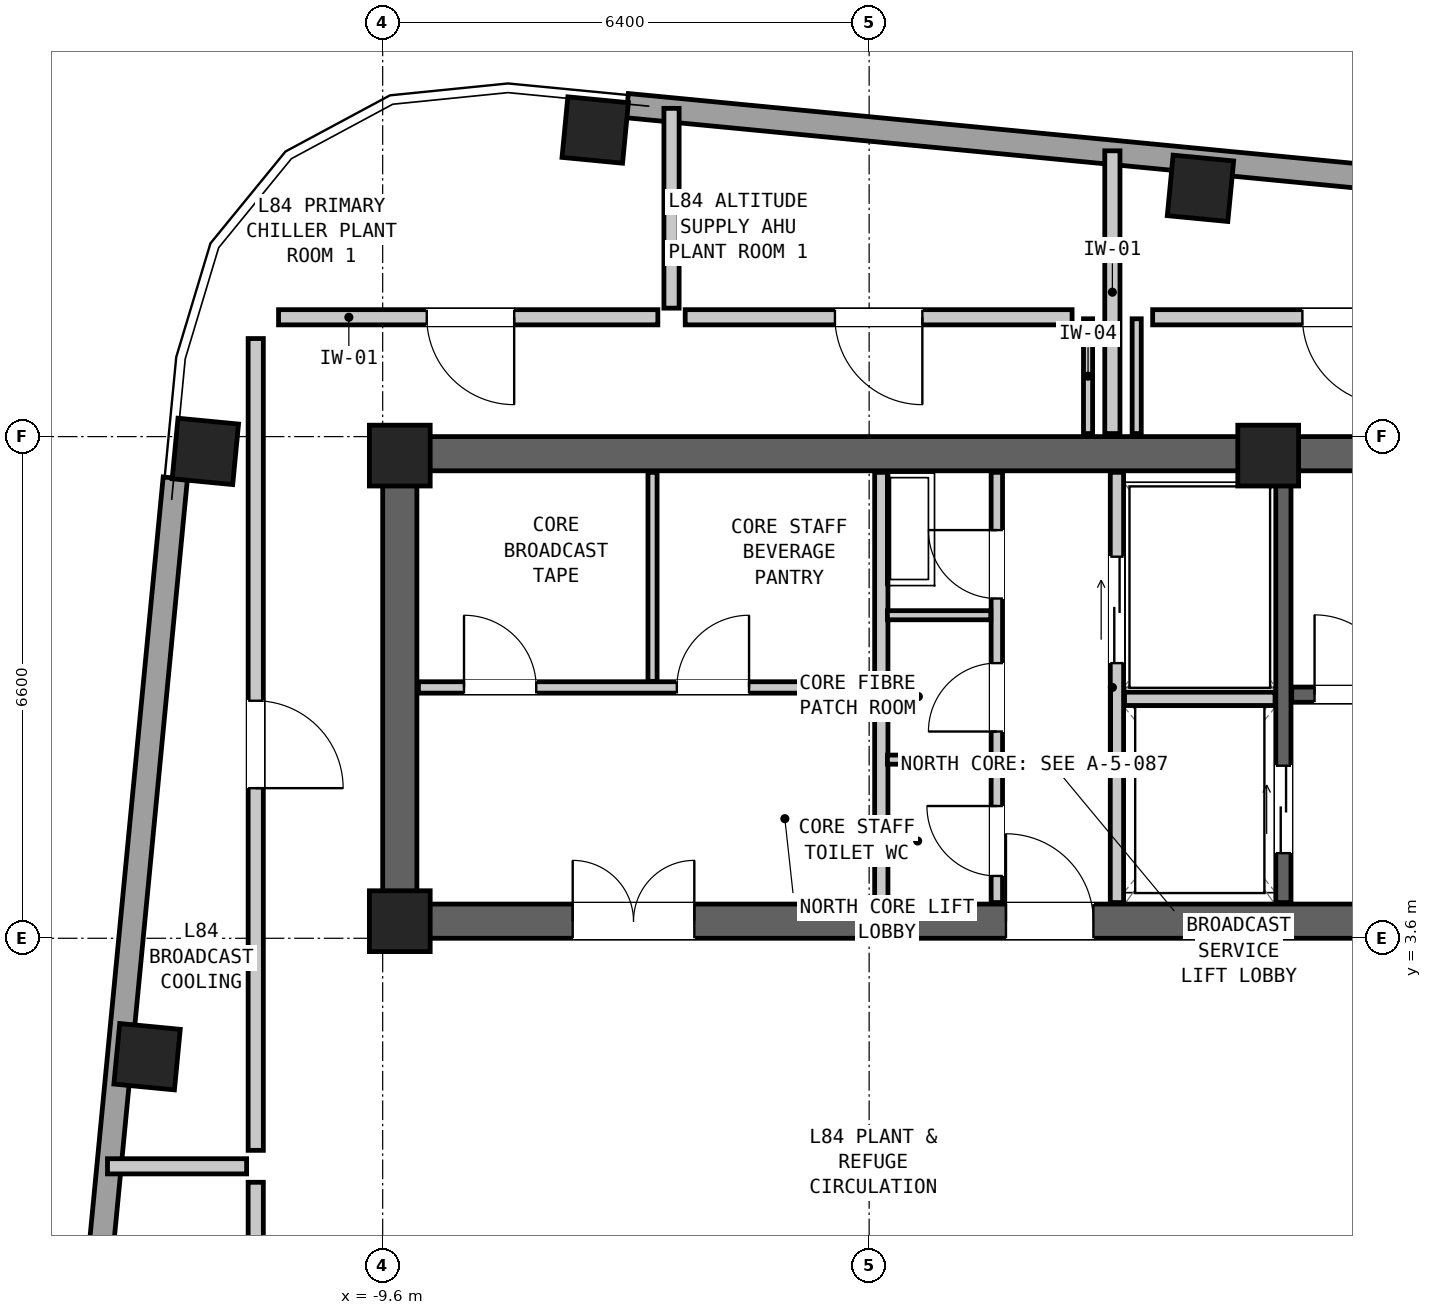
"""IFC4 building model, lengths in metres.
Left out: names, types, materials, properties, quantities, classifications, styles, units other than length and angle.
Written with IfcOpenShell. Run it as: python <this file> out.ifc"""

import sys

from ifc_helpers import new_model, si_unit, direction, frame, frame_2d, origin, origin_2d, place, context, subcontext, project, spatial, rectangle, extrude, element, fill, save


model = new_model("IFC4")
c1 = context("Model", 3, precision=1e-05, world=origin(), true_north=direction((0.0, 1.0)))
c2 = subcontext(c1, "Body", "Model", "MODEL_VIEW")
j1 = project(units=[si_unit("LENGTHUNIT", "METRE"), si_unit("PLANEANGLEUNIT", "RADIAN")], contexts=[c1])
p1 = place(None, origin())
s1 = spatial("IfcSite", under=j1, at=p1, CompositionType="ELEMENT")
p2 = place(p1, origin())
s2 = spatial("IfcBuilding", under=s1, at=p2, CompositionType="ELEMENT")
p3 = place(p2, frame((0.0, 0.0, 284.9)))
s3 = spatial("IfcBuildingStorey", under=s2, at=p3, CompositionType="ELEMENT", Elevation=284.9)
p4 = place(p3, frame((-9.6, 9.975, 0.0), z_axis=(0.0, 0.0, 1.0), x_axis=(1.0, 0.0, 0.0)))
e1 = element("IfcWall", 1, at=p4, inside=s3, PredefinedType="SHEAR", context=c2, shape_type="SweptSolid", body=[
    extrude(rectangle(XDim=19.2, YDim=0.45, at=frame_2d((9.6, 0.0))), origin(), (0.0, 0.0, 1.0), 4.35),
])
p5 = place(p3, frame((-9.6, 3.825, 0.0), z_axis=(0.0, 0.0, 1.0), x_axis=(1.0, 0.0, 0.0)))
e2 = element("IfcWall", 2, at=p5, inside=s3, PredefinedType="SHEAR", context=c2, shape_type="SweptSolid", body=[
    extrude(rectangle(XDim=19.2, YDim=0.45, at=frame_2d((9.6, 0.0))), origin(), (0.0, 0.0, 1.0), 4.35),
])
p6 = place(p5, frame((14.2, 0.0, 0.0)))
e3 = element("IfcOpeningElement", 3, at=p6, cuts=e2, PredefinedType="OPENING", context=c2, shape_type="SweptSolid", body=[
    extrude(rectangle(XDim=1.1, YDim=2.08, at=frame_2d((0.55, 1.04))), frame((0.0, 0.237, 0.0), z_axis=(0.0, -1.0, 0.0), x_axis=(1.0, 0.0, 0.0)), (0.0, 0.0, 1.0), 0.474),
])
p7 = place(p5, frame((8.2, 0.0, 0.0)))
e4 = element("IfcOpeningElement", 4, at=p7, cuts=e2, PredefinedType="OPENING", context=c2, shape_type="SweptSolid", body=[
    extrude(rectangle(XDim=1.15, YDim=2.1, at=frame_2d((0.575, 1.05))), frame((0.0, 0.237, 0.0), z_axis=(0.0, -1.0, 0.0), x_axis=(1.0, 0.0, 0.0)), (0.0, 0.0, 1.0), 0.474),
])
p8 = place(p5, frame((2.5, 0.0, 0.0)))
e5 = element("IfcOpeningElement", 5, at=p8, cuts=e2, PredefinedType="OPENING", context=c2, shape_type="SweptSolid", body=[
    extrude(rectangle(XDim=1.6, YDim=2.12, at=frame_2d((0.8, 1.06))), frame((0.0, 0.237, 0.0), z_axis=(0.0, -1.0, 0.0), x_axis=(1.0, 0.0, 0.0)), (0.0, 0.0, 1.0), 0.474),
])
p9 = place(p3, frame((-9.375, 3.6, 0.0), z_axis=(0.0, 0.0, 1.0), x_axis=(0.0, 1.0, 0.0)))
e6 = element("IfcWall", 6, at=p9, inside=s3, PredefinedType="SHEAR", context=c2, shape_type="SweptSolid", body=[
    extrude(rectangle(XDim=6.6, YDim=0.45, at=frame_2d((3.3, 0.0))), origin(), (0.0, 0.0, 1.0), 4.35),
])
for number, where, z_axis, x_axis in (
    (7, (1.159, 13.467, 0.0), (0.0, 0.0, 1.0), (0.995, -0.096, 0.0)),
    (8, (-6.804, 14.233, 0.0), (0.0, 0.0, 1.0), (0.995, -0.096, 0.0)),
    (9, (-11.933, 10.005, 0.0), (0.0, 0.0, 1.0), (0.096, 0.995, 0.0)),
    (10, (-12.7, 2.042, 0.0), (0.0, 0.0, 1.0), (0.096, 0.995, 0.0)),
    (11, (-9.375, 9.95, 0.0), (0.0, 0.0, 1.0), (1.0, 0.0, 0.0)),
    (12, (2.05, 9.95, 0.0), (0.0, 0.0, 1.0), (1.0, 0.0, 0.0)),
    (13, (-9.375, 3.825, 0.0), (0.0, 0.0, 1.0), (1.0, 0.0, 0.0)),
):
    element("IfcColumn", number, at=place(p3, frame(where, z_axis=z_axis, x_axis=x_axis)), inside=s3, PredefinedType="COLUMN", context=c2, shape_type="SweptSolid", body=[
        extrude(rectangle(XDim=0.8, YDim=0.8, at=origin_2d()), origin(), (0.0, 0.0, 1.0), 4.35),
    ])
p10 = place(p3, frame((-6.383, 14.554, 0.0), z_axis=(0.0, 0.0, 1.0), x_axis=(0.995396520412, -0.095842407898, 0.0)))
e14 = element("IfcWall", 14, at=p10, inside=s3, PredefinedType="SOLIDWALL", context=c2, shape_type="SweptSolid", body=[
    extrude(rectangle(XDim=23.224, YDim=0.32, at=frame_2d((11.612, 0.0))), origin(), (0.0, 0.0, 1.0), 2.25),
])
p11 = place(p3, frame((-14.554, -13.463, 0.0), z_axis=(0.0, 0.0, 1.0), x_axis=(0.095841405003, 0.995396616976, 0.0)))
e15 = element("IfcWall", 15, at=p11, inside=s3, PredefinedType="SOLIDWALL", context=c2, shape_type="SweptSolid", body=[
    extrude(rectangle(XDim=23.224, YDim=0.32, at=frame_2d((11.612, 0.0))), origin(), (0.0, 0.0, 1.0), 2.25),
])
p12 = place(p3, frame((2.36, 6.805, 0.0), z_axis=(0.0, 0.0, 1.0), x_axis=(1.0, 0.0, 0.0)))
e16 = element("IfcWall", 16, at=p12, inside=s3, PredefinedType="SHEAR", context=c2, shape_type="SweptSolid", body=[
    extrude(rectangle(XDim=6.77, YDim=0.2, at=frame_2d((3.385, 0.0))), origin(), (0.0, 0.0, 1.0), 4.07),
])
p13 = place(p12, frame((0.3, 0.0, 0.0)))
e17 = element("IfcOpeningElement", 17, at=p13, cuts=e16, PredefinedType="OPENING", context=c2, shape_type="SweptSolid", body=[
    extrude(rectangle(XDim=1.05, YDim=2.08, at=frame_2d((0.525, 1.04))), frame((0.0, 0.112, 0.0), z_axis=(0.0, -1.0, 0.0), x_axis=(1.0, 0.0, 0.0)), (0.0, 0.0, 1.0), 0.224),
])
p14 = place(p3, frame((2.25, 4.07, 0.0), z_axis=(0.0, 0.0, 1.0), x_axis=(0.0, 1.0, 0.0)))
e18 = element("IfcWall", 18, at=p14, inside=s3, PredefinedType="SHEAR", context=c2, shape_type="SweptSolid", body=[
    extrude(rectangle(XDim=5.66, YDim=0.2, at=frame_2d((2.83, 0.0))), origin(), (0.0, 0.0, 1.0), 4.07),
])
p15 = place(p14, frame((0.65, 0.0, 0.0)))
e19 = element("IfcOpeningElement", 19, at=p15, cuts=e18, PredefinedType="OPENING", context=c2, shape_type="SweptSolid", body=[
    extrude(rectangle(XDim=1.15, YDim=2.08, at=frame_2d((0.575, 1.04))), frame((0.0, 0.112, 0.0), z_axis=(0.0, -1.0, 0.0), x_axis=(1.0, 0.0, 0.0)), (0.0, 0.0, 1.0), 0.224),
])
p16 = place(p3, frame((0.06, 4.07, 0.0), z_axis=(0.0, 0.0, 1.0), x_axis=(0.0, 1.0, 0.0)))
e20 = element("IfcWall", 20, at=p16, inside=s3, PredefinedType="PARTITIONING", context=c2, shape_type="SweptSolid", body=[
    extrude(rectangle(XDim=5.66, YDim=0.175, at=frame_2d((2.83, 0.0))), origin(), (0.0, 0.0, 1.0), 4.07),
])
p17 = place(p16, frame((3.15, 0.0, 0.0)))
e21 = element("IfcOpeningElement", 21, at=p17, cuts=e20, PredefinedType="OPENING", context=c2, shape_type="SweptSolid", body=[
    extrude(rectangle(XDim=1.4, YDim=2.12, at=frame_2d((0.7, 1.06))), frame((0.0, 0.1, 0.0), z_axis=(0.0, -1.0, 0.0), x_axis=(1.0, 0.0, 0.0)), (0.0, 0.0, 1.0), 0.199),
])
p18 = place(p3, frame((0.16, 6.75, 0.0), z_axis=(0.0, 0.0, 1.0), x_axis=(1.0, 0.0, 0.0)))
e22 = element("IfcWall", 22, at=p18, inside=s3, PredefinedType="PARTITIONING", context=c2, shape_type="SweptSolid", body=[
    extrude(rectangle(XDim=1.98, YDim=0.175, at=frame_2d((0.99, 0.0))), origin(), (0.0, 0.0, 1.0), 4.07),
])
p19 = place(p3, frame((-3.04, 4.07, 0.0), z_axis=(0.0, 0.0, 1.0), x_axis=(0.0, 1.0, 0.0)))
e23 = element("IfcWall", 23, at=p19, inside=s3, PredefinedType="PARTITIONING", context=c2, shape_type="SweptSolid", body=[
    extrude(rectangle(XDim=5.66, YDim=0.175, at=frame_2d((2.83, 0.0))), origin(), (0.0, 0.0, 1.0), 4.07),
])
p20 = place(p3, frame((-1.52, 4.07, 0.0), z_axis=(0.0, 0.0, 1.0), x_axis=(0.0, 1.0, 0.0)))
e24 = element("IfcWall", 24, at=p20, inside=s3, PredefinedType="PARTITIONING", context=c2, shape_type="SweptSolid", body=[
    extrude(rectangle(XDim=5.66, YDim=0.15, at=frame_2d((2.83, 0.0))), origin(), (0.0, 0.0, 1.0), 4.07),
])
p21 = place(p20, frame((4.0, 0.0, 0.0)))
e25 = element("IfcOpeningElement", 25, at=p21, cuts=e24, PredefinedType="OPENING", context=c2, shape_type="SweptSolid", body=[
    extrude(rectangle(XDim=0.9, YDim=2.05, at=frame_2d((0.45, 1.025))), frame((0.0, 0.087, 0.0), z_axis=(0.0, -1.0, 0.0), x_axis=(1.0, 0.0, 0.0)), (0.0, 0.0, 1.0), 0.174),
])
p22 = place(p20, frame((2.25, 0.0, 0.0)))
e26 = element("IfcOpeningElement", 26, at=p22, cuts=e24, PredefinedType="OPENING", context=c2, shape_type="SweptSolid", body=[
    extrude(rectangle(XDim=0.9, YDim=2.05, at=frame_2d((0.45, 1.025))), frame((0.0, 0.087, 0.0), z_axis=(0.0, -1.0, 0.0), x_axis=(1.0, 0.0, 0.0)), (0.0, 0.0, 1.0), 0.174),
])
p23 = place(p20, frame((0.35, 0.0, 0.0)))
e27 = element("IfcOpeningElement", 27, at=p23, cuts=e24, PredefinedType="OPENING", context=c2, shape_type="SweptSolid", body=[
    extrude(rectangle(XDim=0.92, YDim=2.1, at=frame_2d((0.46, 1.05))), frame((0.0, 0.087, 0.0), z_axis=(0.0, -1.0, 0.0), x_axis=(1.0, 0.0, 0.0)), (0.0, 0.0, 1.0), 0.174),
])
for number, where, z_axis, x_axis in (
    (28, (-2.96, 5.95, 0.0), (0.0, 0.0, 1.0), (1.0, 0.0, 0.0)),
    (29, (-2.96, 7.85, 0.0), (0.0, 0.0, 1.0), (1.0, 0.0, 0.0)),
):
    element("IfcWall", number, at=place(p3, frame(where, z_axis=z_axis, x_axis=x_axis)), inside=s3, PredefinedType="PARTITIONING", context=c2, shape_type="SweptSolid", body=[
        extrude(rectangle(XDim=1.36, YDim=0.12, at=frame_2d((0.68, 0.0))), origin(), (0.0, 0.0, 1.0), 4.07),
    ])
p24 = place(p3, frame((-9.13, 6.9, 0.0), z_axis=(0.0, 0.0, 1.0), x_axis=(1.0, 0.0, 0.0)))
e30 = element("IfcWall", 30, at=p24, inside=s3, PredefinedType="PARTITIONING", context=c2, shape_type="SweptSolid", body=[
    extrude(rectangle(XDim=6.01, YDim=0.15, at=frame_2d((3.005, 0.0))), origin(), (0.0, 0.0, 1.0), 4.07),
])
p25 = place(p24, frame((0.6, 0.0, 0.0)))
e31 = element("IfcOpeningElement", 31, at=p25, cuts=e30, PredefinedType="OPENING", context=c2, shape_type="SweptSolid", body=[
    extrude(rectangle(XDim=0.95, YDim=2.1, at=frame_2d((0.475, 1.05))), frame((0.0, 0.087, 0.0), z_axis=(0.0, -1.0, 0.0), x_axis=(1.0, 0.0, 0.0)), (0.0, 0.0, 1.0), 0.174),
])
p26 = place(p24, frame((3.4, 0.0, 0.0)))
e32 = element("IfcOpeningElement", 32, at=p26, cuts=e30, PredefinedType="OPENING", context=c2, shape_type="SweptSolid", body=[
    extrude(rectangle(XDim=0.95, YDim=2.1, at=frame_2d((0.475, 1.05))), frame((0.0, 0.087, 0.0), z_axis=(0.0, -1.0, 0.0), x_axis=(1.0, 0.0, 0.0)), (0.0, 0.0, 1.0), 0.174),
])
p27 = place(p3, frame((-6.05, 6.98, 0.0), z_axis=(0.0, 0.0, 1.0), x_axis=(0.0, 1.0, 0.0)))
e33 = element("IfcWall", 33, at=p27, inside=s3, PredefinedType="PARTITIONING", context=c2, shape_type="SweptSolid", body=[
    extrude(rectangle(XDim=2.75, YDim=0.12, at=frame_2d((1.375, 0.0))), origin(), (0.0, 0.0, 1.0), 4.07),
])
p28 = place(p3, frame((0.0, 10.24, 0.0), z_axis=(0.0, 0.0, 1.0), x_axis=(0.0, 1.0, 0.0)))
e34 = element("IfcWall", 34, at=p28, inside=s3, PredefinedType="PARTITIONING", context=c2, shape_type="SweptSolid", body=[
    extrude(rectangle(XDim=3.72, YDim=0.2, at=frame_2d((1.86, 0.0))), origin(), (0.0, 0.0, 1.0), 2.25),
])
for number, where, z_axis, x_axis in (
    (35, (-0.32, 10.24, 0.0), (0.0, 0.0, 1.0), (0.0, 1.0, 0.0)),
    (36, (0.32, 10.24, 0.0), (0.0, 0.0, 1.0), (0.0, 1.0, 0.0)),
):
    element("IfcWall", number, at=place(p3, frame(where, z_axis=z_axis, x_axis=x_axis)), inside=s3, PredefinedType="PARTITIONING", context=c2, shape_type="SweptSolid", body=[
        extrude(rectangle(XDim=1.51, YDim=0.12, at=frame_2d((0.755, 0.0))), origin(), (0.0, 0.0, 1.0), 2.25),
    ])
p29 = place(p3, frame((-5.98, 11.77, 0.0), z_axis=(0.0, 0.0, 1.0), x_axis=(-1.0, 0.0, 0.0)))
e37 = element("IfcWall", 37, at=p29, inside=s3, PredefinedType="PARTITIONING", context=c2, shape_type="SweptSolid", body=[
    extrude(rectangle(XDim=4.99, YDim=0.2, at=frame_2d((2.495, 0.0))), origin(), (0.0, 0.0, 1.0), 4.07),
])
p30 = place(p29, frame((1.89, 0.0, 0.0)))
e38 = element("IfcOpeningElement", 38, at=p30, cuts=e37, PredefinedType="OPENING", context=c2, shape_type="SweptSolid", body=[
    extrude(rectangle(XDim=1.15, YDim=2.1, at=frame_2d((0.575, 1.05))), frame((0.0, 0.112, 0.0), z_axis=(0.0, -1.0, 0.0), x_axis=(1.0, 0.0, 0.0)), (0.0, 0.0, 1.0), 0.224),
])
p31 = place(p3, frame((-5.8, 11.89, 0.0), z_axis=(0.0, 0.0, 1.0), x_axis=(0.0, 1.0, 0.0)))
e39 = element("IfcWall", 39, at=p31, inside=s3, PredefinedType="PARTITIONING", context=c2, shape_type="SweptSolid", body=[
    extrude(rectangle(XDim=2.628, YDim=0.2, at=frame_2d((1.314, 0.0))), origin(), (0.0, 0.0, 1.0), 2.25),
])
p32 = place(p3, frame((-0.53, 11.77, 0.0), z_axis=(0.0, 0.0, 1.0), x_axis=(-1.0, 0.0, 0.0)))
e40 = element("IfcWall", 40, at=p32, inside=s3, PredefinedType="PARTITIONING", context=c2, shape_type="SweptSolid", body=[
    extrude(rectangle(XDim=5.09, YDim=0.2, at=frame_2d((2.545, 0.0))), origin(), (0.0, 0.0, 1.0), 2.932),
])
p33 = place(p32, frame((1.97, 0.0, 0.0)))
e41 = element("IfcOpeningElement", 41, at=p33, cuts=e40, PredefinedType="OPENING", context=c2, shape_type="SweptSolid", body=[
    extrude(rectangle(XDim=1.15, YDim=2.1, at=frame_2d((0.575, 1.05))), frame((0.0, 0.112, 0.0), z_axis=(0.0, -1.0, 0.0), x_axis=(1.0, 0.0, 0.0)), (0.0, 0.0, 1.0), 0.224),
])
p34 = place(p3, frame((5.62, 11.77, 0.0), z_axis=(0.0, 0.0, 1.0), x_axis=(-1.0, 0.0, 0.0)))
e42 = element("IfcWall", 42, at=p34, inside=s3, PredefinedType="PARTITIONING", context=c2, shape_type="SweptSolid", body=[
    extrude(rectangle(XDim=5.09, YDim=0.2, at=frame_2d((2.545, 0.0))), origin(), (0.0, 0.0, 1.0), 2.25),
])
p35 = place(p34, frame((1.97, 0.0, 0.0)))
e43 = element("IfcOpeningElement", 43, at=p35, cuts=e42, PredefinedType="OPENING", context=c2, shape_type="SweptSolid", body=[
    extrude(rectangle(XDim=1.15, YDim=2.1, at=frame_2d((0.575, 1.05))), frame((0.0, 0.112, 0.0), z_axis=(0.0, -1.0, 0.0), x_axis=(1.0, 0.0, 0.0)), (0.0, 0.0, 1.0), 0.224),
])
p36 = place(p3, frame((-13.22, 0.6, 0.0), z_axis=(0.0, 0.0, 1.0), x_axis=(1.0, 0.0, 0.0)))
e44 = element("IfcWall", 44, at=p36, inside=s3, PredefinedType="PARTITIONING", context=c2, shape_type="SweptSolid", body=[
    extrude(rectangle(XDim=1.831, YDim=0.2, at=frame_2d((0.915, 0.0))), origin(), (0.0, 0.0, 1.0), 2.25),
])
p37 = place(p3, frame((-11.27, 0.39, 0.0), z_axis=(0.0, 0.0, 1.0), x_axis=(0.0, -1.0, 0.0)))
e45 = element("IfcWall", 45, at=p37, inside=s3, PredefinedType="PARTITIONING", context=c2, shape_type="SweptSolid", body=[
    extrude(rectangle(XDim=10.68, YDim=0.2, at=frame_2d((5.34, 0.0))), origin(), (0.0, 0.0, 1.0), 4.07),
])
p38 = place(p37, frame((1.561, 0.0, 0.0)))
e46 = element("IfcOpeningElement", 46, at=p38, cuts=e45, PredefinedType="OPENING", context=c2, shape_type="SweptSolid", body=[
    extrude(rectangle(XDim=1.15, YDim=2.1, at=frame_2d((0.575, 1.05))), frame((0.0, 0.112, 0.0), z_axis=(0.0, -1.0, 0.0), x_axis=(1.0, 0.0, 0.0)), (0.0, 0.0, 1.0), 0.224),
])
p39 = place(p3, frame((-11.27, 11.49, 0.0), z_axis=(0.0, 0.0, 1.0), x_axis=(0.0, -1.0, 0.0)))
e47 = element("IfcWall", 47, at=p39, inside=s3, PredefinedType="PARTITIONING", context=c2, shape_type="SweptSolid", body=[
    extrude(rectangle(XDim=10.68, YDim=0.2, at=frame_2d((5.34, 0.0))), origin(), (0.0, 0.0, 1.0), 2.25),
])
p40 = place(p39, frame((4.765, 0.0, 0.0)))
e48 = element("IfcOpeningElement", 48, at=p40, cuts=e47, PredefinedType="OPENING", context=c2, shape_type="SweptSolid", body=[
    extrude(rectangle(XDim=1.15, YDim=2.1, at=frame_2d((0.575, 1.05))), frame((0.0, 0.112, 0.0), z_axis=(0.0, -1.0, 0.0), x_axis=(1.0, 0.0, 0.0)), (0.0, 0.0, 1.0), 0.224),
])
p41 = place(p13, origin())
e49 = element("IfcDoor", 49, at=p41, inside=s3, OperationType="SINGLE_SWING_LEFT", PredefinedType="DOOR", context=c2, shape_type="SweptSolid", body=[
    extrude(rectangle(XDim=1.05, YDim=2.08, at=frame_2d((0.525, 1.04))), frame((0.0, 0.025, 0.0), z_axis=(0.0, -1.0, 0.0), x_axis=(1.0, 0.0, 0.0)), (0.0, 0.0, 1.0), 0.05),
])
fill(e17, e49)
p42 = place(p15, origin())
e50 = element("IfcDoor", 50, at=p42, inside=s3, OperationType="DOUBLE_DOOR_SLIDING", PredefinedType="DOOR", context=c2, shape_type="SweptSolid", body=[
    extrude(rectangle(XDim=1.15, YDim=2.08, at=frame_2d((0.575, 1.04))), frame((0.0, 0.025, 0.0), z_axis=(0.0, -1.0, 0.0), x_axis=(1.0, 0.0, 0.0)), (0.0, 0.0, 1.0), 0.05),
])
fill(e19, e50)
p43 = place(p17, origin())
e51 = element("IfcDoor", 51, at=p43, inside=s3, OperationType="DOUBLE_DOOR_SLIDING", PredefinedType="DOOR", context=c2, shape_type="SweptSolid", body=[
    extrude(rectangle(XDim=1.4, YDim=2.12, at=frame_2d((0.7, 1.06))), frame((0.0, 0.025, 0.0), z_axis=(0.0, -1.0, 0.0), x_axis=(1.0, 0.0, 0.0)), (0.0, 0.0, 1.0), 0.05),
])
fill(e21, e51)
p44 = place(p7, origin())
e52 = element("IfcDoor", 52, at=p44, inside=s3, OperationType="SINGLE_SWING_LEFT", PredefinedType="DOOR", context=c2, shape_type="SweptSolid", body=[
    extrude(rectangle(XDim=1.15, YDim=2.1, at=frame_2d((0.575, 1.05))), frame((0.0, 0.025, 0.0), z_axis=(0.0, -1.0, 0.0), x_axis=(1.0, 0.0, 0.0)), (0.0, 0.0, 1.0), 0.05),
])
fill(e4, e52)
p45 = place(p21, origin())
e53 = element("IfcDoor", 53, at=p45, inside=s3, OperationType="SINGLE_SWING_RIGHT", PredefinedType="DOOR", context=c2, shape_type="SweptSolid", body=[
    extrude(rectangle(XDim=0.9, YDim=2.05, at=frame_2d((0.45, 1.025))), frame((0.0, 0.025, 0.0), z_axis=(0.0, -1.0, 0.0), x_axis=(1.0, 0.0, 0.0)), (0.0, 0.0, 1.0), 0.05),
])
fill(e25, e53)
p46 = place(p22, origin())
e54 = element("IfcDoor", 54, at=p46, inside=s3, OperationType="SINGLE_SWING_LEFT", PredefinedType="DOOR", context=c2, shape_type="SweptSolid", body=[
    extrude(rectangle(XDim=0.9, YDim=2.05, at=frame_2d((0.45, 1.025))), frame((0.0, 0.025, 0.0), z_axis=(0.0, -1.0, 0.0), x_axis=(1.0, 0.0, 0.0)), (0.0, 0.0, 1.0), 0.05),
])
fill(e26, e54)
p47 = place(p23, origin())
e55 = element("IfcDoor", 55, at=p47, inside=s3, OperationType="SINGLE_SWING_RIGHT", PredefinedType="DOOR", context=c2, shape_type="SweptSolid", body=[
    extrude(rectangle(XDim=0.92, YDim=2.1, at=frame_2d((0.46, 1.05))), frame((0.0, 0.025, 0.0), z_axis=(0.0, -1.0, 0.0), x_axis=(1.0, 0.0, 0.0)), (0.0, 0.0, 1.0), 0.05),
])
fill(e27, e55)
p48 = place(p8, origin())
e56 = element("IfcDoor", 56, at=p48, inside=s3, OperationType="DOUBLE_DOOR_SINGLE_SWING", PredefinedType="DOOR", context=c2, shape_type="SweptSolid", body=[
    extrude(rectangle(XDim=1.6, YDim=2.12, at=frame_2d((0.8, 1.06))), frame((0.0, 0.025, 0.0), z_axis=(0.0, -1.0, 0.0), x_axis=(1.0, 0.0, 0.0)), (0.0, 0.0, 1.0), 0.05),
])
fill(e5, e56)
p49 = place(p25, origin())
e57 = element("IfcDoor", 57, at=p49, inside=s3, OperationType="SINGLE_SWING_LEFT", PredefinedType="DOOR", context=c2, shape_type="SweptSolid", body=[
    extrude(rectangle(XDim=0.95, YDim=2.1, at=frame_2d((0.475, 1.05))), frame((0.0, 0.025, 0.0), z_axis=(0.0, -1.0, 0.0), x_axis=(1.0, 0.0, 0.0)), (0.0, 0.0, 1.0), 0.05),
])
fill(e31, e57)
p50 = place(p26, origin())
e58 = element("IfcDoor", 58, at=p50, inside=s3, OperationType="SINGLE_SWING_RIGHT", PredefinedType="DOOR", context=c2, shape_type="SweptSolid", body=[
    extrude(rectangle(XDim=0.95, YDim=2.1, at=frame_2d((0.475, 1.05))), frame((0.0, 0.025, 0.0), z_axis=(0.0, -1.0, 0.0), x_axis=(1.0, 0.0, 0.0)), (0.0, 0.0, 1.0), 0.05),
])
fill(e32, e58)
p51 = place(p30, origin())
e59 = element("IfcDoor", 59, at=p51, inside=s3, OperationType="SINGLE_SWING_LEFT", PredefinedType="DOOR", context=c2, shape_type="SweptSolid", body=[
    extrude(rectangle(XDim=1.15, YDim=2.1, at=frame_2d((0.575, 1.05))), frame((0.0, 0.025, 0.0), z_axis=(0.0, -1.0, 0.0), x_axis=(1.0, 0.0, 0.0)), (0.0, 0.0, 1.0), 0.05),
])
fill(e38, e59)
p52 = place(p33, origin())
e60 = element("IfcDoor", 60, at=p52, inside=s3, OperationType="SINGLE_SWING_LEFT", PredefinedType="DOOR", context=c2, shape_type="SweptSolid", body=[
    extrude(rectangle(XDim=1.15, YDim=2.1, at=frame_2d((0.575, 1.05))), frame((0.0, 0.025, 0.0), z_axis=(0.0, -1.0, 0.0), x_axis=(1.0, 0.0, 0.0)), (0.0, 0.0, 1.0), 0.05),
])
fill(e41, e60)
p53 = place(p35, origin())
e61 = element("IfcDoor", 61, at=p53, inside=s3, OperationType="SINGLE_SWING_LEFT", PredefinedType="DOOR", context=c2, shape_type="SweptSolid", body=[
    extrude(rectangle(XDim=1.15, YDim=2.1, at=frame_2d((0.575, 1.05))), frame((0.0, 0.025, 0.0), z_axis=(0.0, -1.0, 0.0), x_axis=(1.0, 0.0, 0.0)), (0.0, 0.0, 1.0), 0.05),
])
fill(e43, e61)
p54 = place(p40, origin())
e62 = element("IfcDoor", 62, at=p54, inside=s3, OperationType="SINGLE_SWING_RIGHT", PredefinedType="DOOR", context=c2, shape_type="SweptSolid", body=[
    extrude(rectangle(XDim=1.15, YDim=2.1, at=frame_2d((0.575, 1.05))), frame((0.0, 0.025, 0.0), z_axis=(0.0, -1.0, 0.0), x_axis=(1.0, 0.0, 0.0)), (0.0, 0.0, 1.0), 0.05),
])
fill(e48, e62)
save(model, sys.argv[1])
